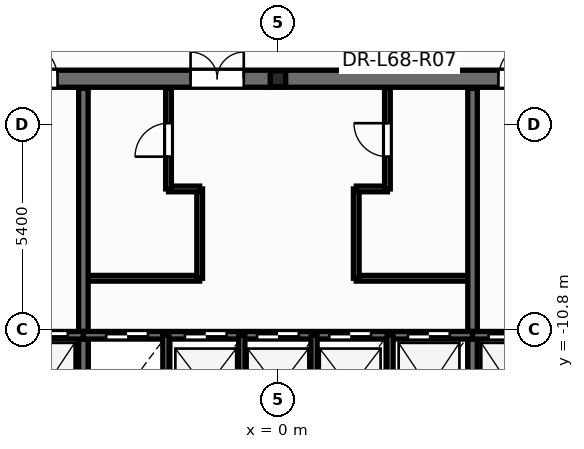
"""IFC4 building model, lengths in metres.
Left out: names, types, materials, properties, quantities, classifications, styles, units other than length and angle.
Written with IfcOpenShell. Run it as: python <this file> out.ifc"""

import sys

from ifc_helpers import new_model, si_unit, direction, frame, frame_2d, origin, origin_2d, place, context, subcontext, project, spatial, rectangle, i_section, extrude, element, fill, save


model = new_model("IFC4")
c1 = context("Model", 3, precision=1e-05, world=origin(), true_north=direction((0.0, 1.0)))
c2 = subcontext(c1, "Body", "Model", "MODEL_VIEW")
j1 = project(units=[si_unit("LENGTHUNIT", "METRE"), si_unit("PLANEANGLEUNIT", "RADIAN")], contexts=[c1])
p1 = place(None, origin())
s1 = spatial("IfcSite", under=j1, at=p1, CompositionType="ELEMENT")
p2 = place(p1, origin())
s2 = spatial("IfcBuilding", under=s1, at=p2, CompositionType="ELEMENT")
p3 = place(p2, frame((0.0, 0.0, 259.8)))
s3 = spatial("IfcBuildingStorey", under=s2, at=p3, CompositionType="ELEMENT", Elevation=259.8)
p4 = place(p3, frame((0.0, -4.2, 0.0), z_axis=(0.0, 0.0, 1.0), x_axis=(1.0, 0.0, 0.0)))
e1 = element("IfcColumn", 1, at=p4, inside=s3, PredefinedType="PILASTER", context=c2, shape_type="SweptSolid", body=[
    extrude(i_section(OverallWidth=0.405, OverallDepth=0.414, WebThickness=0.022, FlangeThickness=0.032, at=origin_2d()), origin(), (0.0, 0.0, 1.0), 3.6),
])
p5 = place(p3, frame((-5.12, -9.45, 0.0), z_axis=(0.0, 0.0, 1.0), x_axis=(1.0, 0.0, 0.0)))
e2 = element("IfcWall", 2, at=p5, inside=s3, PredefinedType="PARTITIONING", context=c2, shape_type="SweptSolid", body=[
    extrude(rectangle(XDim=3.06, YDim=0.15, at=frame_2d((1.53, 0.0))), origin(), (0.0, 0.0, 1.0), 3.345),
])
p6 = place(p3, frame((-2.06, -9.45, 0.0), z_axis=(0.0, 0.0, 1.0), x_axis=(0.0, 1.0, 0.0)))
e3 = element("IfcWall", 3, at=p6, inside=s3, PredefinedType="PARTITIONING", context=c2, shape_type="SweptSolid", body=[
    extrude(rectangle(XDim=2.35, YDim=0.15, at=frame_2d((1.175, 0.0))), origin(), (0.0, 0.0, 1.0), 3.345),
])
p7 = place(p3, frame((-2.88, -7.1, 0.0), z_axis=(0.0, 0.0, 1.0), x_axis=(1.0, 0.0, 0.0)))
e4 = element("IfcWall", 4, at=p7, inside=s3, PredefinedType="PARTITIONING", context=c2, shape_type="SweptSolid", body=[
    extrude(rectangle(XDim=0.82, YDim=0.15, at=frame_2d((0.41, 0.0))), origin(), (0.0, 0.0, 1.0), 3.345),
])
p8 = place(p3, frame((-2.88, -7.1, 0.0), z_axis=(0.0, 0.0, 1.0), x_axis=(0.0, 1.0, 0.0)))
e5 = element("IfcWall", 5, at=p8, inside=s3, PredefinedType="PARTITIONING", context=c2, shape_type="SweptSolid", body=[
    extrude(rectangle(XDim=2.65, YDim=0.15, at=frame_2d((1.325, 0.0))), origin(), (0.0, 0.0, 1.0), 3.345),
])
p9 = place(p8, frame((0.85, 0.0, 0.0)))
e6 = element("IfcOpeningElement", 6, at=p9, cuts=e5, PredefinedType="OPENING", context=c2, shape_type="SweptSolid", body=[
    extrude(rectangle(XDim=0.886, YDim=2.104, at=frame_2d((0.44, 1.052))), frame((0.0, 0.085, 0.0), z_axis=(0.0, -1.0, 0.0), x_axis=(1.0, 0.0, 0.0)), (0.0, 0.0, 1.0), 0.17),
])
p10 = place(p3, frame((2.06, -9.45, 0.0), z_axis=(0.0, 0.0, 1.0), x_axis=(1.0, 0.0, 0.0)))
e7 = element("IfcWall", 7, at=p10, inside=s3, PredefinedType="PARTITIONING", context=c2, shape_type="SweptSolid", body=[
    extrude(rectangle(XDim=3.06, YDim=0.15, at=frame_2d((1.53, 0.0))), origin(), (0.0, 0.0, 1.0), 3.345),
])
p11 = place(p3, frame((2.06, -9.45, 0.0), z_axis=(0.0, 0.0, 1.0), x_axis=(0.0, 1.0, 0.0)))
e8 = element("IfcWall", 8, at=p11, inside=s3, PredefinedType="PARTITIONING", context=c2, shape_type="SweptSolid", body=[
    extrude(rectangle(XDim=2.35, YDim=0.15, at=frame_2d((1.175, 0.0))), origin(), (0.0, 0.0, 1.0), 3.345),
])
p12 = place(p3, frame((2.06, -7.1, 0.0), z_axis=(0.0, 0.0, 1.0), x_axis=(1.0, 0.0, 0.0)))
e9 = element("IfcWall", 9, at=p12, inside=s3, PredefinedType="PARTITIONING", context=c2, shape_type="SweptSolid", body=[
    extrude(rectangle(XDim=0.82, YDim=0.15, at=frame_2d((0.41, 0.0))), origin(), (0.0, 0.0, 1.0), 3.345),
])
p13 = place(p3, frame((2.88, -7.1, 0.0), z_axis=(0.0, 0.0, 1.0), x_axis=(0.0, 1.0, 0.0)))
e10 = element("IfcWall", 10, at=p13, inside=s3, PredefinedType="PARTITIONING", context=c2, shape_type="SweptSolid", body=[
    extrude(rectangle(XDim=2.65, YDim=0.15, at=frame_2d((1.325, 0.0))), origin(), (0.0, 0.0, 1.0), 3.345),
])
p14 = place(p13, frame((0.85, 0.0, 0.0)))
e11 = element("IfcOpeningElement", 11, at=p14, cuts=e10, PredefinedType="OPENING", context=c2, shape_type="SweptSolid", body=[
    extrude(rectangle(XDim=0.886, YDim=2.104, at=frame_2d((0.44, 1.052))), frame((0.0, 0.085, 0.0), z_axis=(0.0, -1.0, 0.0), x_axis=(1.0, 0.0, 0.0)), (0.0, 0.0, 1.0), 0.17),
])
p15 = place(p3, frame((-12.65, -4.2, 0.0), z_axis=(0.0, 0.0, 1.0), x_axis=(1.0, 0.0, 0.0)))
e12 = element("IfcWall", 12, at=p15, inside=s3, PredefinedType="SHEAR", context=c2, shape_type="SweptSolid", body=[
    extrude(rectangle(XDim=25.3, YDim=0.45, at=frame_2d((12.65, 0.0))), origin(), (0.0, 0.0, 1.0), 3.6),
])
p16 = place(p15, frame((0.95, 0.0, 0.0)))
e13 = element("IfcOpeningElement", 13, at=p16, cuts=e12, PredefinedType="OPENING", context=c2, shape_type="SweptSolid", body=[
    extrude(rectangle(XDim=0.756, YDim=2.054, at=frame_2d((0.375, 1.027))), frame((0.0, 0.235, 0.0), z_axis=(0.0, -1.0, 0.0), x_axis=(1.0, 0.0, 0.0)), (0.0, 0.0, 1.0), 0.47),
])
p17 = place(p15, frame((2.6, 0.0, 0.0)))
e14 = element("IfcOpeningElement", 14, at=p17, cuts=e12, PredefinedType="OPENING", context=c2, shape_type="SweptSolid", body=[
    extrude(rectangle(XDim=0.756, YDim=2.054, at=frame_2d((0.375, 1.027))), frame((0.0, 0.235, 0.0), z_axis=(0.0, -1.0, 0.0), x_axis=(1.0, 0.0, 0.0)), (0.0, 0.0, 1.0), 0.47),
])
p18 = place(p15, frame((21.85, 0.0, 0.0)))
e15 = element("IfcOpeningElement", 15, at=p18, cuts=e12, PredefinedType="OPENING", context=c2, shape_type="SweptSolid", body=[
    extrude(rectangle(XDim=0.756, YDim=2.054, at=frame_2d((0.375, 1.027))), frame((0.0, 0.235, 0.0), z_axis=(0.0, -1.0, 0.0), x_axis=(1.0, 0.0, 0.0)), (0.0, 0.0, 1.0), 0.47),
])
p19 = place(p15, frame((23.5, 0.0, 0.0)))
e16 = element("IfcOpeningElement", 16, at=p19, cuts=e12, PredefinedType="OPENING", context=c2, shape_type="SweptSolid", body=[
    extrude(rectangle(XDim=0.756, YDim=2.054, at=frame_2d((0.375, 1.027))), frame((0.0, 0.235, 0.0), z_axis=(0.0, -1.0, 0.0), x_axis=(1.0, 0.0, 0.0)), (0.0, 0.0, 1.0), 0.47),
])
p20 = place(p15, frame((5.85, 0.0, 0.0)))
e17 = element("IfcOpeningElement", 17, at=p20, cuts=e12, PredefinedType="OPENING", context=c2, shape_type="SweptSolid", body=[
    extrude(rectangle(XDim=1.006, YDim=2.104, at=frame_2d((0.5, 1.052))), frame((0.0, 0.235, 0.0), z_axis=(0.0, -1.0, 0.0), x_axis=(1.0, 0.0, 0.0)), (0.0, 0.0, 1.0), 0.47),
])
p21 = place(p15, frame((10.35, 0.0, 0.0)))
e18 = element("IfcOpeningElement", 18, at=p21, cuts=e12, PredefinedType="OPENING", context=c2, shape_type="SweptSolid", body=[
    extrude(rectangle(XDim=1.406, YDim=2.154, at=frame_2d((0.7, 1.077))), frame((0.0, 0.235, 0.0), z_axis=(0.0, -1.0, 0.0), x_axis=(1.0, 0.0, 0.0)), (0.0, 0.0, 1.0), 0.47),
])
p22 = place(p15, frame((18.45, 0.0, 0.0)))
e19 = element("IfcOpeningElement", 19, at=p22, cuts=e12, PredefinedType="OPENING", context=c2, shape_type="SweptSolid", body=[
    extrude(rectangle(XDim=1.006, YDim=2.104, at=frame_2d((0.5, 1.052))), frame((0.0, 0.235, 0.0), z_axis=(0.0, -1.0, 0.0), x_axis=(1.0, 0.0, 0.0)), (0.0, 0.0, 1.0), 0.47),
])
for number, where, z_axis, x_axis in (
    (20, (-5.12, -13.85, 0.0), (0.0, 0.0, 1.0), (0.0, 1.0, 0.0)),
    (21, (5.12, -13.85, 0.0), (0.0, 0.0, 1.0), (0.0, 1.0, 0.0)),
):
    element("IfcWall", number, at=place(p3, frame(where, z_axis=z_axis, x_axis=x_axis)), inside=s3, PredefinedType="SHEAR", context=c2, shape_type="SweptSolid", body=[
        extrude(rectangle(XDim=9.4, YDim=0.25, at=frame_2d((4.7, 0.0))), origin(), (0.0, 0.0, 1.0), 3.6),
    ])
p23 = place(p3, frame((-8.48, -10.95, 0.0), z_axis=(0.0, 0.0, 1.0), x_axis=(1.0, 0.0, 0.0)))
e22 = element("IfcWall", 22, at=p23, inside=s3, PredefinedType="SOLIDWALL", context=c2, shape_type="SweptSolid", body=[
    extrude(rectangle(XDim=3.36, YDim=0.2, at=frame_2d((1.68, 0.0))), origin(), (0.0, 0.0, 1.0), 3.6),
])
p24 = place(p23, frame((0.28, 0.0, 0.0)))
e23 = element("IfcOpeningElement", 23, at=p24, cuts=e22, PredefinedType="OPENING", context=c2, shape_type="SweptSolid", body=[
    extrude(rectangle(XDim=0.756, YDim=2.054, at=frame_2d((0.375, 1.027))), frame((0.0, 0.11, 0.0), z_axis=(0.0, -1.0, 0.0), x_axis=(1.0, 0.0, 0.0)), (0.0, 0.0, 1.0), 0.22),
])
p25 = place(p23, frame((1.85, 0.0, 0.0)))
e24 = element("IfcOpeningElement", 24, at=p25, cuts=e22, PredefinedType="OPENING", context=c2, shape_type="SweptSolid", body=[
    extrude(rectangle(XDim=1.106, YDim=2.104, at=frame_2d((0.55, 1.052))), frame((0.0, 0.11, 0.0), z_axis=(0.0, -1.0, 0.0), x_axis=(1.0, 0.0, 0.0)), (0.0, 0.0, 1.0), 0.22),
])
p26 = place(p3, frame((-5.12, -10.95, 0.0), z_axis=(0.0, 0.0, 1.0), x_axis=(1.0, 0.0, 0.0)))
e25 = element("IfcWall", 25, at=p26, inside=s3, PredefinedType="SOLIDWALL", context=c2, shape_type="SweptSolid", body=[
    extrude(rectangle(XDim=10.24, YDim=0.2, at=frame_2d((5.12, 0.0))), origin(), (0.0, 0.0, 1.0), 3.6),
])
p27 = place(p26, frame((0.6, 0.0, 0.0)))
e26 = element("IfcOpeningElement", 26, at=p27, cuts=e25, PredefinedType="OPENING", context=c2, shape_type="SweptSolid", body=[
    extrude(rectangle(XDim=1.106, YDim=2.104, at=frame_2d((0.55, 1.052))), frame((0.0, 0.11, 0.0), z_axis=(0.0, -1.0, 0.0), x_axis=(1.0, 0.0, 0.0)), (0.0, 0.0, 1.0), 0.22),
])
p28 = place(p26, frame((2.67, 0.0, 0.0)))
e27 = element("IfcOpeningElement", 27, at=p28, cuts=e25, PredefinedType="OPENING", context=c2, shape_type="SweptSolid", body=[
    extrude(rectangle(XDim=1.106, YDim=2.104, at=frame_2d((0.55, 1.052))), frame((0.0, 0.11, 0.0), z_axis=(0.0, -1.0, 0.0), x_axis=(1.0, 0.0, 0.0)), (0.0, 0.0, 1.0), 0.22),
])
p29 = place(p26, frame((4.57, 0.0, 0.0)))
e28 = element("IfcOpeningElement", 28, at=p29, cuts=e25, PredefinedType="OPENING", context=c2, shape_type="SweptSolid", body=[
    extrude(rectangle(XDim=1.106, YDim=2.104, at=frame_2d((0.55, 1.052))), frame((0.0, 0.11, 0.0), z_axis=(0.0, -1.0, 0.0), x_axis=(1.0, 0.0, 0.0)), (0.0, 0.0, 1.0), 0.22),
])
p30 = place(p26, frame((6.47, 0.0, 0.0)))
e29 = element("IfcOpeningElement", 29, at=p30, cuts=e25, PredefinedType="OPENING", context=c2, shape_type="SweptSolid", body=[
    extrude(rectangle(XDim=1.106, YDim=2.104, at=frame_2d((0.55, 1.052))), frame((0.0, 0.11, 0.0), z_axis=(0.0, -1.0, 0.0), x_axis=(1.0, 0.0, 0.0)), (0.0, 0.0, 1.0), 0.22),
])
p31 = place(p26, frame((8.54, 0.0, 0.0)))
e30 = element("IfcOpeningElement", 30, at=p31, cuts=e25, PredefinedType="OPENING", context=c2, shape_type="SweptSolid", body=[
    extrude(rectangle(XDim=1.106, YDim=2.104, at=frame_2d((0.55, 1.052))), frame((0.0, 0.11, 0.0), z_axis=(0.0, -1.0, 0.0), x_axis=(1.0, 0.0, 0.0)), (0.0, 0.0, 1.0), 0.22),
])
p32 = place(p3, frame((5.12, -10.95, 0.0), z_axis=(0.0, 0.0, 1.0), x_axis=(1.0, 0.0, 0.0)))
e31 = element("IfcWall", 31, at=p32, inside=s3, PredefinedType="SOLIDWALL", context=c2, shape_type="SweptSolid", body=[
    extrude(rectangle(XDim=3.36, YDim=0.2, at=frame_2d((1.68, 0.0))), origin(), (0.0, 0.0, 1.0), 3.6),
])
p33 = place(p32, frame((0.42, 0.0, 0.0)))
e32 = element("IfcOpeningElement", 32, at=p33, cuts=e31, PredefinedType="OPENING", context=c2, shape_type="SweptSolid", body=[
    extrude(rectangle(XDim=1.106, YDim=2.104, at=frame_2d((0.55, 1.052))), frame((0.0, 0.11, 0.0), z_axis=(0.0, -1.0, 0.0), x_axis=(1.0, 0.0, 0.0)), (0.0, 0.0, 1.0), 0.22),
])
p34 = place(p32, frame((2.3, 0.0, 0.0)))
e33 = element("IfcOpeningElement", 33, at=p34, cuts=e31, PredefinedType="OPENING", context=c2, shape_type="SweptSolid", body=[
    extrude(rectangle(XDim=0.756, YDim=2.054, at=frame_2d((0.375, 1.027))), frame((0.0, 0.11, 0.0), z_axis=(0.0, -1.0, 0.0), x_axis=(1.0, 0.0, 0.0)), (0.0, 0.0, 1.0), 0.22),
])
for number, where, z_axis, x_axis in (
    (34, (-2.95, -13.85, 0.0), (0.0, 0.0, 1.0), (0.0, 1.0, 0.0)),
    (35, (2.95, -13.85, 0.0), (0.0, 0.0, 1.0), (0.0, 1.0, 0.0)),
    (36, (-0.95, -13.85, 0.0), (0.0, 0.0, 1.0), (0.0, 1.0, 0.0)),
    (37, (0.95, -13.85, 0.0), (0.0, 0.0, 1.0), (0.0, 1.0, 0.0)),
):
    element("IfcWall", number, at=place(p3, frame(where, z_axis=z_axis, x_axis=x_axis)), inside=s3, PredefinedType="PARTITIONING", context=c2, shape_type="SweptSolid", body=[
        extrude(rectangle(XDim=2.9, YDim=0.16, at=frame_2d((1.45, 0.0))), origin(), (0.0, 0.0, 1.0), 2.57),
    ])
p35 = place(p9, origin())
e38 = element("IfcDoor", 38, at=p35, inside=s3, OperationType="SINGLE_SWING_LEFT", PredefinedType="DOOR", context=c2, shape_type="SweptSolid", body=[
    extrude(rectangle(XDim=0.88, YDim=2.1, at=frame_2d((0.44, 1.05))), frame((0.0, 0.025, 0.0), z_axis=(0.0, -1.0, 0.0), x_axis=(1.0, 0.0, 0.0)), (0.0, 0.0, 1.0), 0.05),
])
fill(e6, e38)
p36 = place(p14, origin())
e39 = element("IfcDoor", 39, at=p36, inside=s3, OperationType="SINGLE_SWING_RIGHT", PredefinedType="DOOR", context=c2, shape_type="SweptSolid", body=[
    extrude(rectangle(XDim=0.88, YDim=2.1, at=frame_2d((0.44, 1.05))), frame((0.0, 0.025, 0.0), z_axis=(0.0, -1.0, 0.0), x_axis=(1.0, 0.0, 0.0)), (0.0, 0.0, 1.0), 0.05),
])
fill(e11, e39)
p37 = place(p25, origin())
e40 = element("IfcDoor", 40, at=p37, inside=s3, OperationType="DOUBLE_DOOR_SLIDING", PredefinedType="DOOR", context=c2, shape_type="SweptSolid", body=[
    extrude(rectangle(XDim=1.1, YDim=2.1, at=frame_2d((0.55, 1.05))), frame((0.0, 0.025, 0.0), z_axis=(0.0, -1.0, 0.0), x_axis=(1.0, 0.0, 0.0)), (0.0, 0.0, 1.0), 0.05),
])
fill(e24, e40)
p38 = place(p33, origin())
e41 = element("IfcDoor", 41, at=p38, inside=s3, OperationType="DOUBLE_DOOR_SLIDING", PredefinedType="DOOR", context=c2, shape_type="SweptSolid", body=[
    extrude(rectangle(XDim=1.1, YDim=2.1, at=frame_2d((0.55, 1.05))), frame((0.0, 0.025, 0.0), z_axis=(0.0, -1.0, 0.0), x_axis=(1.0, 0.0, 0.0)), (0.0, 0.0, 1.0), 0.05),
])
fill(e32, e41)
p39 = place(p27, origin())
e42 = element("IfcDoor", 42, at=p39, inside=s3, OperationType="DOUBLE_DOOR_SLIDING", PredefinedType="DOOR", context=c2, shape_type="SweptSolid", body=[
    extrude(rectangle(XDim=1.1, YDim=2.1, at=frame_2d((0.55, 1.05))), frame((0.0, 0.025, 0.0), z_axis=(0.0, -1.0, 0.0), x_axis=(1.0, 0.0, 0.0)), (0.0, 0.0, 1.0), 0.05),
])
fill(e26, e42)
p40 = place(p28, origin())
e43 = element("IfcDoor", 43, at=p40, inside=s3, OperationType="DOUBLE_DOOR_SLIDING", PredefinedType="DOOR", context=c2, shape_type="SweptSolid", body=[
    extrude(rectangle(XDim=1.1, YDim=2.1, at=frame_2d((0.55, 1.05))), frame((0.0, 0.025, 0.0), z_axis=(0.0, -1.0, 0.0), x_axis=(1.0, 0.0, 0.0)), (0.0, 0.0, 1.0), 0.05),
])
fill(e27, e43)
p41 = place(p29, origin())
e44 = element("IfcDoor", 44, at=p41, inside=s3, OperationType="DOUBLE_DOOR_SLIDING", PredefinedType="DOOR", context=c2, shape_type="SweptSolid", body=[
    extrude(rectangle(XDim=1.1, YDim=2.1, at=frame_2d((0.55, 1.05))), frame((0.0, 0.025, 0.0), z_axis=(0.0, -1.0, 0.0), x_axis=(1.0, 0.0, 0.0)), (0.0, 0.0, 1.0), 0.05),
])
fill(e28, e44)
p42 = place(p30, origin())
e45 = element("IfcDoor", 45, at=p42, inside=s3, OperationType="DOUBLE_DOOR_SLIDING", PredefinedType="DOOR", context=c2, shape_type="SweptSolid", body=[
    extrude(rectangle(XDim=1.1, YDim=2.1, at=frame_2d((0.55, 1.05))), frame((0.0, 0.025, 0.0), z_axis=(0.0, -1.0, 0.0), x_axis=(1.0, 0.0, 0.0)), (0.0, 0.0, 1.0), 0.05),
])
fill(e29, e45)
p43 = place(p31, origin())
e46 = element("IfcDoor", 46, at=p43, inside=s3, OperationType="DOUBLE_DOOR_SLIDING", PredefinedType="DOOR", context=c2, shape_type="SweptSolid", body=[
    extrude(rectangle(XDim=1.1, YDim=2.1, at=frame_2d((0.55, 1.05))), frame((0.0, 0.025, 0.0), z_axis=(0.0, -1.0, 0.0), x_axis=(1.0, 0.0, 0.0)), (0.0, 0.0, 1.0), 0.05),
])
fill(e30, e46)
p44 = place(p20, origin())
e47 = element("IfcDoor", 47, at=p44, inside=s3, OperationType="SINGLE_SWING_LEFT", PredefinedType="DOOR", context=c2, shape_type="SweptSolid", body=[
    extrude(rectangle(XDim=1.0, YDim=2.1, at=frame_2d((0.5, 1.05))), frame((0.0, 0.025, 0.0), z_axis=(0.0, -1.0, 0.0), x_axis=(1.0, 0.0, 0.0)), (0.0, 0.0, 1.0), 0.05),
])
fill(e17, e47)
p45 = place(p21, origin())
e48 = element("IfcDoor", 48, at=p45, inside=s3, OperationType="DOUBLE_DOOR_SINGLE_SWING", PredefinedType="DOOR", context=c2, shape_type="SweptSolid", body=[
    extrude(rectangle(XDim=1.4, YDim=2.15, at=frame_2d((0.7, 1.075))), frame((0.0, 0.025, 0.0), z_axis=(0.0, -1.0, 0.0), x_axis=(1.0, 0.0, 0.0)), (0.0, 0.0, 1.0), 0.05),
])
fill(e18, e48)
p46 = place(p22, origin())
e49 = element("IfcDoor", 49, at=p46, inside=s3, OperationType="SINGLE_SWING_RIGHT", PredefinedType="DOOR", context=c2, shape_type="SweptSolid", body=[
    extrude(rectangle(XDim=1.0, YDim=2.1, at=frame_2d((0.5, 1.05))), frame((0.0, 0.025, 0.0), z_axis=(0.0, -1.0, 0.0), x_axis=(1.0, 0.0, 0.0)), (0.0, 0.0, 1.0), 0.05),
])
fill(e19, e49)
save(model, sys.argv[1])
